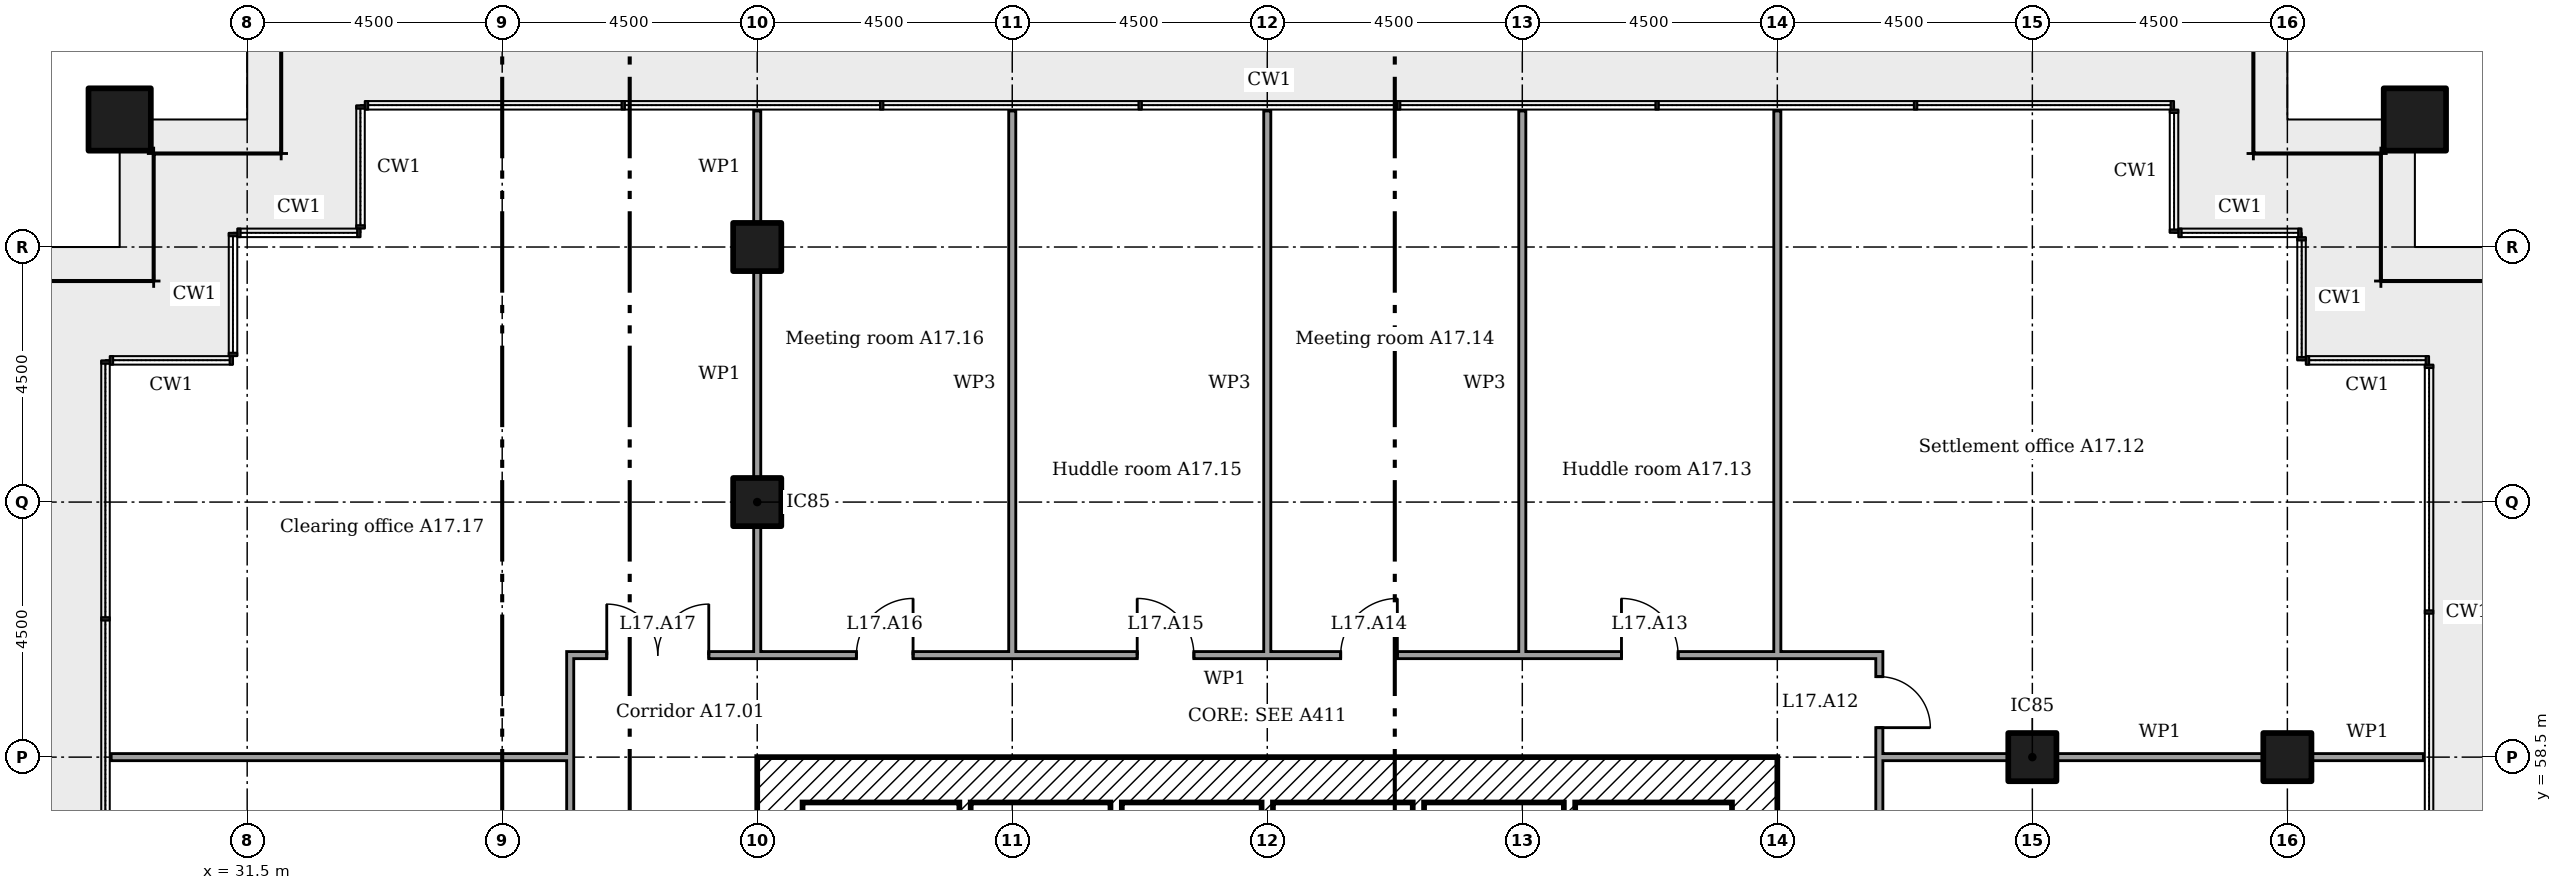
"""IFC4 building model, lengths in metres.
Left out: names, types, materials, properties, quantities, classifications, styles, units other than length and angle.
Written with IfcOpenShell. Run it as: python <this file> out.ifc"""

import sys

from ifc_helpers import new_model, si_unit, direction, frame, frame_2d, origin, origin_2d, place, context, subcontext, project, spatial, rectangle, extrude, element, fill, save


model = new_model("IFC4")
c1 = context("Model", 3, precision=1e-05, world=origin(), true_north=direction((0.0, 1.0)))
c2 = subcontext(c1, "Body", "Model", "MODEL_VIEW")
j1 = project(units=[si_unit("LENGTHUNIT", "METRE"), si_unit("PLANEANGLEUNIT", "RADIAN")], contexts=[c1])
p1 = place(None, origin())
s1 = spatial("IfcSite", under=j1, at=p1, CompositionType="ELEMENT")
p2 = place(p1, origin())
s2 = spatial("IfcBuilding", under=s1, at=p2, CompositionType="ELEMENT")
p3 = place(p2, frame((0.0, 0.0, 72.6)))
s3 = spatial("IfcBuildingStorey", under=s2, at=p3, CompositionType="ELEMENT", Elevation=72.6)
for number, where in (
    (1, (69.75, 69.75, 0.0)),
    (2, (29.25, 69.75, 0.0)),
):
    element("IfcColumn", number, at=place(p3, frame(where)), inside=s3, PredefinedType="COLUMN", context=c2, shape_type="SweptSolid", body=[
        extrude(rectangle(XDim=1.1, YDim=1.1, at=origin_2d()), origin(), (0.0, 0.0, 1.0), 3.6),
    ])
for number, where in (
    (3, (40.5, 63.0, 0.0)),
    (4, (40.5, 67.5, 0.0)),
    (5, (63.0, 58.5, 0.0)),
    (6, (67.5, 58.5, 0.0)),
):
    element("IfcColumn", number, at=place(p3, frame(where)), inside=s3, PredefinedType="COLUMN", context=c2, shape_type="SweptSolid", body=[
        extrude(rectangle(XDim=0.85, YDim=0.85, at=origin_2d()), origin(), (0.0, 0.0, 1.0), 3.6),
    ])
p4 = place(p3, frame((58.1, 40.5, 0.0), z_axis=(0.0, 0.0, 1.0), x_axis=(0.0, 1.0, 0.0)))
e7 = element("IfcWall", 7, at=p4, inside=s3, PredefinedType="SHEAR", context=c2, shape_type="SweptSolid", body=[
    extrude(rectangle(XDim=18.0, YDim=0.8, at=frame_2d((9.0, 0.0))), origin(), (0.0, 0.0, 1.0), 3.35),
])
p5 = place(p4, frame((13.15, 0.0, 0.0)))
e8 = element("IfcOpeningElement", 8, at=p5, cuts=e7, PredefinedType="OPENING", context=c2, shape_type="SweptSolid", body=[
    extrude(rectangle(XDim=1.2, YDim=2.1, at=frame_2d((0.6, 1.05))), frame((0.0, 0.41, 0.0), z_axis=(0.0, -1.0, 0.0), x_axis=(1.0, 0.0, 0.0)), (0.0, 0.0, 1.0), 0.82),
])
p6 = place(p4, frame((3.9, 0.0, 0.0)))
e9 = element("IfcOpeningElement", 9, at=p6, cuts=e7, PredefinedType="OPENING", context=c2, shape_type="SweptSolid", body=[
    extrude(rectangle(XDim=1.8, YDim=2.1, at=frame_2d((0.9, 1.05))), frame((0.0, 0.41, 0.0), z_axis=(0.0, -1.0, 0.0), x_axis=(1.0, 0.0, 0.0)), (0.0, 0.0, 1.0), 0.82),
])
p7 = place(p4, frame((11.525, 0.0, 0.0)))
e10 = element("IfcOpeningElement", 10, at=p7, cuts=e7, PredefinedType="OPENING", context=c2, shape_type="SweptSolid", body=[
    extrude(rectangle(XDim=1.0, YDim=2.1, at=frame_2d((0.5, 1.05))), frame((0.0, 0.41, 0.0), z_axis=(0.0, -1.0, 0.0), x_axis=(1.0, 0.0, 0.0)), (0.0, 0.0, 1.0), 0.82),
])
p8 = place(p3, frame((41.3, 58.1, 0.0)))
e11 = element("IfcWall", 11, at=p8, inside=s3, PredefinedType="SHEAR", context=c2, shape_type="SweptSolid", body=[
    extrude(rectangle(XDim=16.4, YDim=0.8, at=frame_2d((8.2, 0.0))), origin(), (0.0, 0.0, 1.0), 3.35),
])
p9 = place(p3, frame((40.9, 40.5, 0.0), z_axis=(0.0, 0.0, 1.0), x_axis=(0.0, 1.0, 0.0)))
e12 = element("IfcWall", 12, at=p9, inside=s3, PredefinedType="SHEAR", context=c2, shape_type="SweptSolid", body=[
    extrude(rectangle(XDim=18.0, YDim=0.8, at=frame_2d((9.0, 0.0))), origin(), (0.0, 0.0, 1.0), 3.35),
])
p10 = place(p9, frame((3.65, 0.0, 0.0)))
e13 = element("IfcOpeningElement", 13, at=p10, cuts=e12, PredefinedType="OPENING", context=c2, shape_type="SweptSolid", body=[
    extrude(rectangle(XDim=1.2, YDim=2.1, at=frame_2d((0.6, 1.05))), frame((0.0, 0.41, 0.0), z_axis=(0.0, -1.0, 0.0), x_axis=(1.0, 0.0, 0.0)), (0.0, 0.0, 1.0), 0.82),
])
p11 = place(p9, frame((5.475, 0.0, 0.0)))
e14 = element("IfcOpeningElement", 14, at=p11, cuts=e12, PredefinedType="OPENING", context=c2, shape_type="SweptSolid", body=[
    extrude(rectangle(XDim=1.0, YDim=2.1, at=frame_2d((0.5, 1.05))), frame((0.0, 0.41, 0.0), z_axis=(0.0, -1.0, 0.0), x_axis=(1.0, 0.0, 0.0)), (0.0, 0.0, 1.0), 0.82),
])
p12 = place(p9, frame((12.3, 0.0, 0.0)))
e15 = element("IfcOpeningElement", 15, at=p12, cuts=e12, PredefinedType="OPENING", context=c2, shape_type="SweptSolid", body=[
    extrude(rectangle(XDim=1.0, YDim=2.1, at=frame_2d((0.5, 1.05))), frame((0.0, 0.41, 0.0), z_axis=(0.0, -1.0, 0.0), x_axis=(1.0, 0.0, 0.0)), (0.0, 0.0, 1.0), 0.82),
])
p13 = place(p3, frame((44.167, 57.7, 0.0), z_axis=(0.0, 0.0, 1.0), x_axis=(0.0, -1.0, 0.0)))
e16 = element("IfcWall", 16, at=p13, inside=s3, PredefinedType="SHEAR", context=c2, shape_type="SweptSolid", body=[
    extrude(rectangle(XDim=3.3, YDim=0.2, at=frame_2d((1.65, 0.0))), origin(), (0.0, 0.0, 1.0), 3.35),
])
p14 = place(p3, frame((46.833, 57.7, 0.0), z_axis=(0.0, 0.0, 1.0), x_axis=(0.0, -1.0, 0.0)))
e17 = element("IfcWall", 17, at=p14, inside=s3, PredefinedType="SHEAR", context=c2, shape_type="SweptSolid", body=[
    extrude(rectangle(XDim=4.4, YDim=0.2, at=frame_2d((2.2, 0.0))), origin(), (0.0, 0.0, 1.0), 3.35),
])
for number, where, z_axis, x_axis in (
    (18, (49.5, 57.7, 0.0), (0.0, 0.0, 1.0), (0.0, -1.0, 0.0)),
    (19, (52.167, 57.7, 0.0), (0.0, 0.0, 1.0), (0.0, -1.0, 0.0)),
    (20, (54.833, 57.7, 0.0), (0.0, 0.0, 1.0), (0.0, -1.0, 0.0)),
):
    element("IfcWall", number, at=place(p3, frame(where, z_axis=z_axis, x_axis=x_axis)), inside=s3, PredefinedType="SHEAR", context=c2, shape_type="SweptSolid", body=[
        extrude(rectangle(XDim=2.5, YDim=0.2, at=frame_2d((1.25, 0.0))), origin(), (0.0, 0.0, 1.0), 3.35),
    ])
p15 = place(p3, frame((29.1, 58.5, 0.0)))
e21 = element("IfcWall", 21, at=p15, inside=s3, PredefinedType="PARTITIONING", context=c2, shape_type="SweptSolid", body=[
    extrude(rectangle(XDim=8.1, YDim=0.125, at=frame_2d((4.05, 0.0))), origin(), (0.0, 0.0, 1.0), 2.766),
])
p16 = place(p3, frame((60.3, 58.5, 0.0)))
e22 = element("IfcWall", 22, at=p16, inside=s3, PredefinedType="PARTITIONING", context=c2, shape_type="SweptSolid", body=[
    extrude(rectangle(XDim=2.275, YDim=0.125, at=frame_2d((1.137, 0.0))), origin(), (0.0, 0.0, 1.0), 2.676),
])
p17 = place(p3, frame((63.425, 58.5, 0.0)))
e23 = element("IfcWall", 23, at=p17, inside=s3, PredefinedType="PARTITIONING", context=c2, shape_type="SweptSolid", body=[
    extrude(rectangle(XDim=3.65, YDim=0.125, at=frame_2d((1.825, 0.0))), origin(), (0.0, 0.0, 1.0), 2.676),
])
p18 = place(p3, frame((67.925, 58.5, 0.0)))
e24 = element("IfcWall", 24, at=p18, inside=s3, PredefinedType="PARTITIONING", context=c2, shape_type="SweptSolid", body=[
    extrude(rectangle(XDim=1.975, YDim=0.125, at=frame_2d((0.987, 0.0))), origin(), (0.0, 0.0, 1.0), 2.676),
])
p19 = place(p3, frame((37.137, 60.3, 0.0)))
e25 = element("IfcWall", 25, at=p19, inside=s3, PredefinedType="PARTITIONING", context=c2, shape_type="SweptSolid", body=[
    extrude(rectangle(XDim=23.225, YDim=0.125, at=frame_2d((11.613, 0.0))), origin(), (0.0, 0.0, 1.0), 3.45),
])
p20 = place(p19, frame((18.613, 0.0, 0.0)))
e26 = element("IfcOpeningElement", 26, at=p20, cuts=e25, PredefinedType="OPENING", context=c2, shape_type="SweptSolid", body=[
    extrude(rectangle(XDim=1.0, YDim=2.1, at=frame_2d((0.5, 1.05))), frame((0.0, 0.073, 0.0), z_axis=(0.0, -1.0, 0.0), x_axis=(1.0, 0.0, 0.0)), (0.0, 0.0, 1.0), 0.145),
])
p21 = place(p19, frame((13.657, 0.0, 0.0)))
e27 = element("IfcOpeningElement", 27, at=p21, cuts=e25, PredefinedType="OPENING", context=c2, shape_type="SweptSolid", body=[
    extrude(rectangle(XDim=1.0, YDim=2.1, at=frame_2d((0.5, 1.05))), frame((0.0, 0.073, 0.0), z_axis=(0.0, -1.0, 0.0), x_axis=(1.0, 0.0, 0.0)), (0.0, 0.0, 1.0), 0.145),
])
p22 = place(p19, frame((10.067, 0.0, 0.0)))
e28 = element("IfcOpeningElement", 28, at=p22, cuts=e25, PredefinedType="OPENING", context=c2, shape_type="SweptSolid", body=[
    extrude(rectangle(XDim=1.0, YDim=2.1, at=frame_2d((0.5, 1.05))), frame((0.0, 0.073, 0.0), z_axis=(0.0, -1.0, 0.0), x_axis=(1.0, 0.0, 0.0)), (0.0, 0.0, 1.0), 0.145),
])
p23 = place(p19, frame((5.113, 0.0, 0.0)))
e29 = element("IfcOpeningElement", 29, at=p23, cuts=e25, PredefinedType="OPENING", context=c2, shape_type="SweptSolid", body=[
    extrude(rectangle(XDim=1.0, YDim=2.1, at=frame_2d((0.5, 1.05))), frame((0.0, 0.073, 0.0), z_axis=(0.0, -1.0, 0.0), x_axis=(1.0, 0.0, 0.0)), (0.0, 0.0, 1.0), 0.145),
])
p24 = place(p19, frame((0.708, 0.0, 0.0)))
e30 = element("IfcOpeningElement", 30, at=p24, cuts=e25, PredefinedType="OPENING", context=c2, shape_type="SweptSolid", body=[
    extrude(rectangle(XDim=1.8, YDim=2.1, at=frame_2d((0.9, 1.05))), frame((0.0, 0.073, 0.0), z_axis=(0.0, -1.0, 0.0), x_axis=(1.0, 0.0, 0.0)), (0.0, 0.0, 1.0), 0.145),
])
p25 = place(p3, frame((37.2, 38.762, 0.0), z_axis=(0.0, 0.0, 1.0), x_axis=(0.0, 1.0, 0.0)))
e31 = element("IfcWall", 31, at=p25, inside=s3, PredefinedType="PARTITIONING", context=c2, shape_type="SweptSolid", body=[
    extrude(rectangle(XDim=21.475, YDim=0.125, at=frame_2d((10.738, 0.0))), origin(), (0.0, 0.0, 1.0), 3.45),
])
p26 = place(p25, frame((7.988, 0.0, 0.0)))
e32 = element("IfcOpeningElement", 32, at=p26, cuts=e31, PredefinedType="OPENING", context=c2, shape_type="SweptSolid", body=[
    extrude(rectangle(XDim=1.0, YDim=2.1, at=frame_2d((0.5, 1.05))), frame((0.0, 0.073, 0.0), z_axis=(0.0, -1.0, 0.0), x_axis=(1.0, 0.0, 0.0)), (0.0, 0.0, 1.0), 0.145),
])
p27 = place(p25, frame((3.032, 0.0, 0.0)))
e33 = element("IfcOpeningElement", 33, at=p27, cuts=e31, PredefinedType="OPENING", context=c2, shape_type="SweptSolid", body=[
    extrude(rectangle(XDim=1.0, YDim=2.1, at=frame_2d((0.5, 1.05))), frame((0.0, 0.073, 0.0), z_axis=(0.0, -1.0, 0.0), x_axis=(1.0, 0.0, 0.0)), (0.0, 0.0, 1.0), 0.145),
])
p28 = place(p25, frame((17.442, 0.0, 0.0)))
e34 = element("IfcOpeningElement", 34, at=p28, cuts=e31, PredefinedType="OPENING", context=c2, shape_type="SweptSolid", body=[
    extrude(rectangle(XDim=1.0, YDim=2.1, at=frame_2d((0.5, 1.05))), frame((0.0, 0.073, 0.0), z_axis=(0.0, -1.0, 0.0), x_axis=(1.0, 0.0, 0.0)), (0.0, 0.0, 1.0), 0.145),
])
p29 = place(p25, frame((12.488, 0.0, 0.0)))
e35 = element("IfcOpeningElement", 35, at=p29, cuts=e31, PredefinedType="OPENING", context=c2, shape_type="SweptSolid", body=[
    extrude(rectangle(XDim=1.0, YDim=2.1, at=frame_2d((0.5, 1.05))), frame((0.0, 0.073, 0.0), z_axis=(0.0, -1.0, 0.0), x_axis=(1.0, 0.0, 0.0)), (0.0, 0.0, 1.0), 0.145),
])
p30 = place(p3, frame((40.5, 60.3, 0.0), z_axis=(0.0, 0.0, 1.0), x_axis=(0.0, 1.0, 0.0)))
e36 = element("IfcWall", 36, at=p30, inside=s3, PredefinedType="PARTITIONING", context=c2, shape_type="SweptSolid", body=[
    extrude(rectangle(XDim=2.275, YDim=0.125, at=frame_2d((1.137, 0.0))), origin(), (0.0, 0.0, 1.0), 2.676),
])
p31 = place(p3, frame((40.5, 63.425, 0.0), z_axis=(0.0, 0.0, 1.0), x_axis=(0.0, 1.0, 0.0)))
e37 = element("IfcWall", 37, at=p31, inside=s3, PredefinedType="PARTITIONING", context=c2, shape_type="SweptSolid", body=[
    extrude(rectangle(XDim=3.65, YDim=0.125, at=frame_2d((1.825, 0.0))), origin(), (0.0, 0.0, 1.0), 2.676),
])
p32 = place(p3, frame((40.5, 67.925, 0.0), z_axis=(0.0, 0.0, 1.0), x_axis=(0.0, 1.0, 0.0)))
e38 = element("IfcWall", 38, at=p32, inside=s3, PredefinedType="PARTITIONING", context=c2, shape_type="SweptSolid", body=[
    extrude(rectangle(XDim=1.975, YDim=0.125, at=frame_2d((0.987, 0.0))), origin(), (0.0, 0.0, 1.0), 2.676),
])
for number, where, z_axis, x_axis in (
    (39, (45.0, 60.3, 0.0), (0.0, 0.0, 1.0), (0.0, 1.0, 0.0)),
    (40, (49.5, 60.3, 0.0), (0.0, 0.0, 1.0), (0.0, 1.0, 0.0)),
    (41, (54.0, 60.3, 0.0), (0.0, 0.0, 1.0), (0.0, 1.0, 0.0)),
):
    element("IfcWall", number, at=place(p3, frame(where, z_axis=z_axis, x_axis=x_axis)), inside=s3, PredefinedType="MOVABLE", context=c2, shape_type="SweptSolid", body=[
        extrude(rectangle(XDim=9.6, YDim=0.125, at=frame_2d((4.8, 0.0))), origin(), (0.0, 0.0, 1.0), 2.766),
    ])
p33 = place(p3, frame((58.5, 60.3, 0.0), z_axis=(0.0, 0.0, 1.0), x_axis=(0.0, 1.0, 0.0)))
e42 = element("IfcWall", 42, at=p33, inside=s3, PredefinedType="PARTITIONING", context=c2, shape_type="SweptSolid", body=[
    extrude(rectangle(XDim=9.6, YDim=0.125, at=frame_2d((4.8, 0.0))), origin(), (0.0, 0.0, 1.0), 2.766),
])
p34 = place(p3, frame((60.3, 38.762, 0.0), z_axis=(0.0, 0.0, 1.0), x_axis=(0.0, 1.0, 0.0)))
e43 = element("IfcWall", 43, at=p34, inside=s3, PredefinedType="PARTITIONING", context=c2, shape_type="SweptSolid", body=[
    extrude(rectangle(XDim=21.475, YDim=0.125, at=frame_2d((10.738, 0.0))), origin(), (0.0, 0.0, 1.0), 3.45),
])
p35 = place(p34, frame((3.032, 0.0, 0.0)))
e44 = element("IfcOpeningElement", 44, at=p35, cuts=e43, PredefinedType="OPENING", context=c2, shape_type="SweptSolid", body=[
    extrude(rectangle(XDim=1.0, YDim=2.1, at=frame_2d((0.5, 1.05))), frame((0.0, 0.073, 0.0), z_axis=(0.0, -1.0, 0.0), x_axis=(1.0, 0.0, 0.0)), (0.0, 0.0, 1.0), 0.145),
])
p36 = place(p34, frame((8.442, 0.0, 0.0)))
e45 = element("IfcOpeningElement", 45, at=p36, cuts=e43, PredefinedType="OPENING", context=c2, shape_type="SweptSolid", body=[
    extrude(rectangle(XDim=1.0, YDim=2.1, at=frame_2d((0.5, 1.05))), frame((0.0, 0.073, 0.0), z_axis=(0.0, -1.0, 0.0), x_axis=(1.0, 0.0, 0.0)), (0.0, 0.0, 1.0), 0.145),
])
p37 = place(p34, frame((12.488, 0.0, 0.0)))
e46 = element("IfcOpeningElement", 46, at=p37, cuts=e43, PredefinedType="OPENING", context=c2, shape_type="SweptSolid", body=[
    extrude(rectangle(XDim=1.0, YDim=2.1, at=frame_2d((0.5, 1.05))), frame((0.0, 0.073, 0.0), z_axis=(0.0, -1.0, 0.0), x_axis=(1.0, 0.0, 0.0)), (0.0, 0.0, 1.0), 0.145),
])
p38 = place(p34, frame((16.532, 0.0, 0.0)))
e47 = element("IfcOpeningElement", 47, at=p38, cuts=e43, PredefinedType="OPENING", context=c2, shape_type="SweptSolid", body=[
    extrude(rectangle(XDim=1.0, YDim=2.1, at=frame_2d((0.5, 1.05))), frame((0.0, 0.073, 0.0), z_axis=(0.0, -1.0, 0.0), x_axis=(1.0, 0.0, 0.0)), (0.0, 0.0, 1.0), 0.145),
])
p39 = place(p34, frame((20.258, 0.0, 0.0)))
e48 = element("IfcOpeningElement", 48, at=p39, cuts=e43, PredefinedType="OPENING", context=c2, shape_type="SweptSolid", body=[
    extrude(rectangle(XDim=0.9, YDim=2.1, at=frame_2d((0.45, 1.05))), frame((0.0, 0.073, 0.0), z_axis=(0.0, -1.0, 0.0), x_axis=(1.0, 0.0, 0.0)), (0.0, 0.0, 1.0), 0.145),
])
p40 = place(p39, frame((0.9, 0.0, 0.0), x_axis=(-1.0, 0.0, 0.0)))
e49 = element("IfcDoor", 49, at=p40, inside=s3, OperationType="SINGLE_SWING_LEFT", PredefinedType="DOOR", context=c2, shape_type="SweptSolid", body=[
    extrude(rectangle(XDim=0.9, YDim=2.1, at=frame_2d((0.45, 1.05))), frame((0.0, 0.025, 0.0), z_axis=(0.0, -1.0, 0.0), x_axis=(1.0, 0.0, 0.0)), (0.0, 0.0, 1.0), 0.05),
])
fill(e48, e49)
p41 = place(p20, origin())
e50 = element("IfcDoor", 50, at=p41, inside=s3, OperationType="SINGLE_SWING_RIGHT", PredefinedType="DOOR", context=c2, shape_type="SweptSolid", body=[
    extrude(rectangle(XDim=1.0, YDim=2.1, at=frame_2d((0.5, 1.05))), frame((0.0, 0.025, 0.0), z_axis=(0.0, -1.0, 0.0), x_axis=(1.0, 0.0, 0.0)), (0.0, 0.0, 1.0), 0.05),
])
fill(e26, e50)
p42 = place(p21, origin())
e51 = element("IfcDoor", 51, at=p42, inside=s3, OperationType="SINGLE_SWING_LEFT", PredefinedType="DOOR", context=c2, shape_type="SweptSolid", body=[
    extrude(rectangle(XDim=1.0, YDim=2.1, at=frame_2d((0.5, 1.05))), frame((0.0, 0.025, 0.0), z_axis=(0.0, -1.0, 0.0), x_axis=(1.0, 0.0, 0.0)), (0.0, 0.0, 1.0), 0.05),
])
fill(e27, e51)
p43 = place(p22, origin())
e52 = element("IfcDoor", 52, at=p43, inside=s3, OperationType="SINGLE_SWING_RIGHT", PredefinedType="DOOR", context=c2, shape_type="SweptSolid", body=[
    extrude(rectangle(XDim=1.0, YDim=2.1, at=frame_2d((0.5, 1.05))), frame((0.0, 0.025, 0.0), z_axis=(0.0, -1.0, 0.0), x_axis=(1.0, 0.0, 0.0)), (0.0, 0.0, 1.0), 0.05),
])
fill(e28, e52)
p44 = place(p23, origin())
e53 = element("IfcDoor", 53, at=p44, inside=s3, OperationType="SINGLE_SWING_LEFT", PredefinedType="DOOR", context=c2, shape_type="SweptSolid", body=[
    extrude(rectangle(XDim=1.0, YDim=2.1, at=frame_2d((0.5, 1.05))), frame((0.0, 0.025, 0.0), z_axis=(0.0, -1.0, 0.0), x_axis=(1.0, 0.0, 0.0)), (0.0, 0.0, 1.0), 0.05),
])
fill(e29, e53)
p45 = place(p24, origin())
e54 = element("IfcDoor", 54, at=p45, inside=s3, OperationType="DOUBLE_DOOR_SINGLE_SWING", PredefinedType="DOOR", context=c2, shape_type="SweptSolid", body=[
    extrude(rectangle(XDim=1.8, YDim=2.1, at=frame_2d((0.9, 1.05))), frame((0.0, 0.025, 0.0), z_axis=(0.0, -1.0, 0.0), x_axis=(1.0, 0.0, 0.0)), (0.0, 0.0, 1.0), 0.05),
])
fill(e30, e54)
save(model, sys.argv[1])
